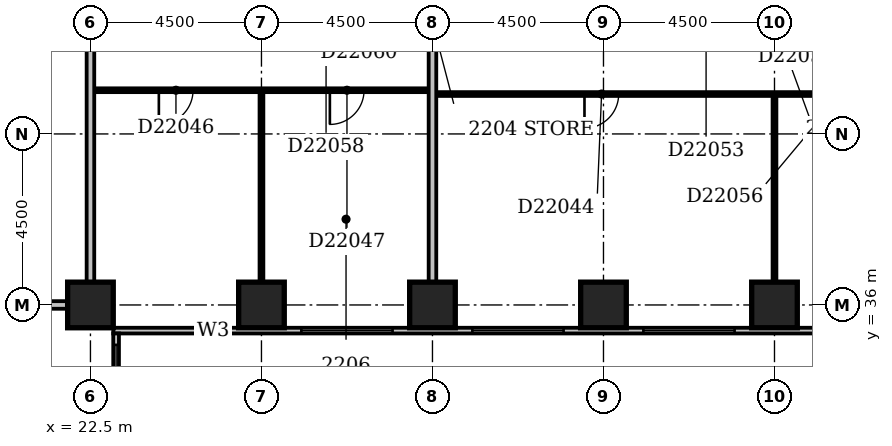
"""IFC4 building model, lengths in metres.
Left out: names, types, materials, properties, quantities, classifications, styles, units other than length and angle.
Written with IfcOpenShell. Run it as: python <this file> out.ifc"""

import sys

from ifc_helpers import new_model, si_unit, direction, frame, frame_2d, origin, origin_2d, place, context, subcontext, project, spatial, rectangle, extrude, element, fill, save


model = new_model("IFC4")
c1 = context("Model", 3, precision=1e-05, world=origin(), true_north=direction((0.0, 1.0)))
c2 = subcontext(c1, "Body", "Model", "MODEL_VIEW")
j1 = project(units=[si_unit("LENGTHUNIT", "METRE"), si_unit("PLANEANGLEUNIT", "RADIAN")], contexts=[c1])
p1 = place(None, origin())
s1 = spatial("IfcSite", under=j1, at=p1, CompositionType="ELEMENT")
p2 = place(p1, origin())
s2 = spatial("IfcBuilding", under=s1, at=p2, CompositionType="ELEMENT")
p3 = place(p2, frame((0.0, 0.0, 90.2)))
s3 = spatial("IfcBuildingStorey", under=s2, at=p3, CompositionType="ELEMENT", Elevation=90.2)
for number, where, z_axis, x_axis in (
    (1, (22.5, 36.0, -0.3), (0.0, 0.0, 1.0), (1.0, 0.0, 0.0)),
    (2, (27.0, 36.0, -0.3), (0.0, 0.0, 1.0), (1.0, 0.0, 0.0)),
    (3, (31.5, 36.0, -0.3), (0.0, 0.0, 1.0), (1.0, 0.0, 0.0)),
    (4, (36.0, 36.0, -0.3), (0.0, 0.0, 1.0), (1.0, 0.0, 0.0)),
    (5, (40.5, 36.0, -0.3), (0.0, 0.0, 1.0), (1.0, 0.0, 0.0)),
):
    element("IfcColumn", number, at=place(p3, frame(where, z_axis=z_axis, x_axis=x_axis)), inside=s3, PredefinedType="COLUMN", context=c2, shape_type="SweptSolid", body=[
        extrude(rectangle(XDim=1.2, YDim=1.2, at=origin_2d()), origin(), (0.0, 0.0, 1.0), 3.6),
    ])
p4 = place(p3, frame((23.175, 17.4, 0.0), z_axis=(0.0, 0.0, 1.0), x_axis=(0.0, 1.0, 0.0)))
e6 = element("IfcWall", 6, at=p4, inside=s3, PredefinedType="STANDARD", context=c2, shape_type="SweptSolid", body=[
    extrude(rectangle(XDim=17.85, YDim=0.15, at=frame_2d((8.925, 0.0))), origin(), (0.0, 0.0, 1.0), 2.7),
])
p5 = place(p4, frame((3.0, 0.0, 0.6)))
e7 = element("IfcOpeningElement", 7, at=p5, cuts=e6, PredefinedType="OPENING", context=c2, shape_type="SweptSolid", body=[
    extrude(rectangle(XDim=1.2, YDim=1.8, at=frame_2d((0.6, 0.9))), frame((0.0, 0.087, 0.0), z_axis=(0.0, -1.0, 0.0), x_axis=(1.0, 0.0, 0.0)), (0.0, 0.0, 1.0), 0.174),
])
p6 = place(p4, frame((6.15, 0.0, 0.6)))
e8 = element("IfcOpeningElement", 8, at=p6, cuts=e6, PredefinedType="OPENING", context=c2, shape_type="SweptSolid", body=[
    extrude(rectangle(XDim=2.4, YDim=1.8, at=frame_2d((1.2, 0.9))), frame((0.0, 0.087, 0.0), z_axis=(0.0, -1.0, 0.0), x_axis=(1.0, 0.0, 0.0)), (0.0, 0.0, 1.0), 0.174),
])
p7 = place(p4, frame((10.65, 0.0, 0.6)))
e9 = element("IfcOpeningElement", 9, at=p7, cuts=e6, PredefinedType="OPENING", context=c2, shape_type="SweptSolid", body=[
    extrude(rectangle(XDim=2.4, YDim=1.8, at=frame_2d((1.2, 0.9))), frame((0.0, 0.087, 0.0), z_axis=(0.0, -1.0, 0.0), x_axis=(1.0, 0.0, 0.0)), (0.0, 0.0, 1.0), 0.174),
])
p8 = place(p4, frame((15.15, 0.0, 0.6)))
e10 = element("IfcOpeningElement", 10, at=p8, cuts=e6, PredefinedType="OPENING", context=c2, shape_type="SweptSolid", body=[
    extrude(rectangle(XDim=2.4, YDim=1.8, at=frame_2d((1.2, 0.9))), frame((0.0, 0.087, 0.0), z_axis=(0.0, -1.0, 0.0), x_axis=(1.0, 0.0, 0.0)), (0.0, 0.0, 1.0), 0.174),
])
p9 = place(p3, frame((23.1, 35.325, 0.0), z_axis=(0.0, 0.0, 1.0), x_axis=(1.0, 0.0, 0.0)))
e11 = element("IfcWall", 11, at=p9, inside=s3, PredefinedType="STANDARD", context=c2, shape_type="SweptSolid", body=[
    extrude(rectangle(XDim=45.15, YDim=0.15, at=frame_2d((22.575, 0.0))), origin(), (0.0, 0.0, 1.0), 2.7),
])
p10 = place(p9, frame((2.185, 0.0, 0.6)))
e12 = element("IfcOpeningElement", 12, at=p10, cuts=e11, PredefinedType="OPENING", context=c2, shape_type="SweptSolid", body=[
    extrude(rectangle(XDim=0.9, YDim=1.8, at=frame_2d((0.45, 0.9))), frame((0.0, 0.087, 0.0), z_axis=(0.0, -1.0, 0.0), x_axis=(1.0, 0.0, 0.0)), (0.0, 0.0, 1.0), 0.174),
])
p11 = place(p9, frame((4.95, 0.0, 0.6)))
e13 = element("IfcOpeningElement", 13, at=p11, cuts=e11, PredefinedType="OPENING", context=c2, shape_type="SweptSolid", body=[
    extrude(rectangle(XDim=2.4, YDim=1.8, at=frame_2d((1.2, 0.9))), frame((0.0, 0.087, 0.0), z_axis=(0.0, -1.0, 0.0), x_axis=(1.0, 0.0, 0.0)), (0.0, 0.0, 1.0), 0.174),
])
p12 = place(p9, frame((9.45, 0.0, 0.6)))
e14 = element("IfcOpeningElement", 14, at=p12, cuts=e11, PredefinedType="OPENING", context=c2, shape_type="SweptSolid", body=[
    extrude(rectangle(XDim=2.4, YDim=1.8, at=frame_2d((1.2, 0.9))), frame((0.0, 0.087, 0.0), z_axis=(0.0, -1.0, 0.0), x_axis=(1.0, 0.0, 0.0)), (0.0, 0.0, 1.0), 0.174),
])
p13 = place(p9, frame((13.95, 0.0, 0.6)))
e15 = element("IfcOpeningElement", 15, at=p13, cuts=e11, PredefinedType="OPENING", context=c2, shape_type="SweptSolid", body=[
    extrude(rectangle(XDim=2.4, YDim=1.8, at=frame_2d((1.2, 0.9))), frame((0.0, 0.087, 0.0), z_axis=(0.0, -1.0, 0.0), x_axis=(1.0, 0.0, 0.0)), (0.0, 0.0, 1.0), 0.174),
])
p14 = place(p9, frame((18.45, 0.0, 0.6)))
e16 = element("IfcOpeningElement", 16, at=p14, cuts=e11, PredefinedType="OPENING", context=c2, shape_type="SweptSolid", body=[
    extrude(rectangle(XDim=2.4, YDim=1.8, at=frame_2d((1.2, 0.9))), frame((0.0, 0.087, 0.0), z_axis=(0.0, -1.0, 0.0), x_axis=(1.0, 0.0, 0.0)), (0.0, 0.0, 1.0), 0.174),
])
p15 = place(p9, frame((22.71, 0.0, 0.6)))
e17 = element("IfcOpeningElement", 17, at=p15, cuts=e11, PredefinedType="OPENING", context=c2, shape_type="SweptSolid", body=[
    extrude(rectangle(XDim=1.8, YDim=1.8, at=frame_2d((0.9, 0.9))), frame((0.0, 0.087, 0.0), z_axis=(0.0, -1.0, 0.0), x_axis=(1.0, 0.0, 0.0)), (0.0, 0.0, 1.0), 0.174),
])
p16 = place(p9, frame((28.861, 0.0, 0.6)))
e18 = element("IfcOpeningElement", 18, at=p16, cuts=e11, PredefinedType="OPENING", context=c2, shape_type="SweptSolid", body=[
    extrude(rectangle(XDim=1.2, YDim=1.8, at=frame_2d((0.6, 0.9))), frame((0.0, 0.087, 0.0), z_axis=(0.0, -1.0, 0.0), x_axis=(1.0, 0.0, 0.0)), (0.0, 0.0, 1.0), 0.174),
])
p17 = place(p9, frame((31.95, 0.0, 0.6)))
e19 = element("IfcOpeningElement", 19, at=p17, cuts=e11, PredefinedType="OPENING", context=c2, shape_type="SweptSolid", body=[
    extrude(rectangle(XDim=2.4, YDim=1.8, at=frame_2d((1.2, 0.9))), frame((0.0, 0.087, 0.0), z_axis=(0.0, -1.0, 0.0), x_axis=(1.0, 0.0, 0.0)), (0.0, 0.0, 1.0), 0.174),
])
p18 = place(p9, frame((36.45, 0.0, 0.6)))
e20 = element("IfcOpeningElement", 20, at=p18, cuts=e11, PredefinedType="OPENING", context=c2, shape_type="SweptSolid", body=[
    extrude(rectangle(XDim=2.4, YDim=1.8, at=frame_2d((1.2, 0.9))), frame((0.0, 0.087, 0.0), z_axis=(0.0, -1.0, 0.0), x_axis=(1.0, 0.0, 0.0)), (0.0, 0.0, 1.0), 0.174),
])
p19 = place(p9, frame((40.95, 0.0, 0.6)))
e21 = element("IfcOpeningElement", 21, at=p19, cuts=e11, PredefinedType="OPENING", context=c2, shape_type="SweptSolid", body=[
    extrude(rectangle(XDim=2.4, YDim=1.8, at=frame_2d((1.2, 0.9))), frame((0.0, 0.087, 0.0), z_axis=(0.0, -1.0, 0.0), x_axis=(1.0, 0.0, 0.0)), (0.0, 0.0, 1.0), 0.174),
])
p20 = place(p3, frame((9.1, 36.0, 0.0), z_axis=(0.0, 0.0, 1.0), x_axis=(1.0, 0.0, 0.0)))
e22 = element("IfcWall", 22, at=p20, inside=s3, PredefinedType="PARTITIONING", context=c2, shape_type="SweptSolid", body=[
    extrude(rectangle(XDim=12.8, YDim=0.2, at=frame_2d((6.4, 0.0))), origin(), (0.0, 0.0, 1.0), 2.4),
])
p21 = place(p3, frame((22.5, 36.6, 0.0), z_axis=(0.0, 0.0, 1.0), x_axis=(0.0, 1.0, 0.0)))
e23 = element("IfcWall", 23, at=p21, inside=s3, PredefinedType="PARTITIONING", context=c2, shape_type="SweptSolid", body=[
    extrude(rectangle(XDim=12.8, YDim=0.2, at=frame_2d((6.4, 0.0))), origin(), (0.0, 0.0, 1.0), 3.3),
])
p22 = place(p3, frame((27.0, 36.6, 0.0), z_axis=(0.0, 0.0, 1.0), x_axis=(0.0, 1.0, 0.0)))
e24 = element("IfcWall", 24, at=p22, inside=s3, PredefinedType="PARTITIONING", context=c2, shape_type="SweptSolid", body=[
    extrude(rectangle(XDim=5.0, YDim=0.1, at=frame_2d((2.5, 0.0))), origin(), (0.0, 0.0, 1.0), 2.6),
])
p23 = place(p3, frame((31.5, 36.6, 0.0), z_axis=(0.0, 0.0, 1.0), x_axis=(0.0, 1.0, 0.0)))
e25 = element("IfcWall", 25, at=p23, inside=s3, PredefinedType="PARTITIONING", context=c2, shape_type="SweptSolid", body=[
    extrude(rectangle(XDim=12.8, YDim=0.2, at=frame_2d((6.4, 0.0))), origin(), (0.0, 0.0, 1.0), 3.3),
])
p24 = place(p3, frame((40.5, 36.6, 0.0), z_axis=(0.0, 0.0, 1.0), x_axis=(0.0, 1.0, 0.0)))
e26 = element("IfcWall", 26, at=p24, inside=s3, PredefinedType="PARTITIONING", context=c2, shape_type="SweptSolid", body=[
    extrude(rectangle(XDim=4.9, YDim=0.1, at=frame_2d((2.45, 0.0))), origin(), (0.0, 0.0, 1.0), 3.3),
])
p25 = place(p3, frame((31.6, 41.55, 0.0), z_axis=(0.0, 0.0, 1.0), x_axis=(1.0, 0.0, 0.0)))
e27 = element("IfcWall", 27, at=p25, inside=s3, PredefinedType="PARTITIONING", context=c2, shape_type="SweptSolid", body=[
    extrude(rectangle(XDim=13.3, YDim=0.1, at=frame_2d((6.65, 0.0))), origin(), (0.0, 0.0, 1.0), 3.3),
])
p26 = place(p25, frame((3.9, 0.0, 0.0)))
e28 = element("IfcOpeningElement", 28, at=p26, cuts=e27, PredefinedType="OPENING", context=c2, shape_type="SweptSolid", body=[
    extrude(rectangle(XDim=0.9, YDim=2.1, at=frame_2d((0.45, 1.05))), frame((0.0, 0.062, 0.0), z_axis=(0.0, -1.0, 0.0), x_axis=(1.0, 0.0, 0.0)), (0.0, 0.0, 1.0), 0.124),
])
p27 = place(p25, frame((10.7, 0.0, 0.0)))
e29 = element("IfcOpeningElement", 29, at=p27, cuts=e27, PredefinedType="OPENING", context=c2, shape_type="SweptSolid", body=[
    extrude(rectangle(XDim=0.9, YDim=2.1, at=frame_2d((0.45, 1.05))), frame((0.0, 0.062, 0.0), z_axis=(0.0, -1.0, 0.0), x_axis=(1.0, 0.0, 0.0)), (0.0, 0.0, 1.0), 0.124),
])
p28 = place(p3, frame((22.6, 41.65, 0.0), z_axis=(0.0, 0.0, 1.0), x_axis=(1.0, 0.0, 0.0)))
e30 = element("IfcWall", 30, at=p28, inside=s3, PredefinedType="PARTITIONING", context=c2, shape_type="SweptSolid", body=[
    extrude(rectangle(XDim=8.8, YDim=0.1, at=frame_2d((4.4, 0.0))), origin(), (0.0, 0.0, 1.0), 3.3),
])
p29 = place(p28, frame((1.7, 0.0, 0.0)))
e31 = element("IfcOpeningElement", 31, at=p29, cuts=e30, PredefinedType="OPENING", context=c2, shape_type="SweptSolid", body=[
    extrude(rectangle(XDim=0.9, YDim=2.1, at=frame_2d((0.45, 1.05))), frame((0.0, 0.062, 0.0), z_axis=(0.0, -1.0, 0.0), x_axis=(1.0, 0.0, 0.0)), (0.0, 0.0, 1.0), 0.124),
])
p30 = place(p28, frame((6.2, 0.0, 0.0)))
e32 = element("IfcOpeningElement", 32, at=p30, cuts=e30, PredefinedType="OPENING", context=c2, shape_type="SweptSolid", body=[
    extrude(rectangle(XDim=0.9, YDim=2.1, at=frame_2d((0.45, 1.05))), frame((0.0, 0.062, 0.0), z_axis=(0.0, -1.0, 0.0), x_axis=(1.0, 0.0, 0.0)), (0.0, 0.0, 1.0), 0.124),
])
p31 = place(p8, origin())
e33 = element("IfcWindow", 33, at=p31, inside=s3, PartitioningType="SINGLE_PANEL", PredefinedType="WINDOW", context=c2, shape_type="SweptSolid", body=[
    extrude(rectangle(XDim=2.4, YDim=1.8, at=frame_2d((1.2, 0.9))), frame((0.0, 0.03, 0.0), z_axis=(0.0, -1.0, 0.0), x_axis=(1.0, 0.0, 0.0)), (0.0, 0.0, 1.0), 0.06),
])
fill(e10, e33)
p32 = place(p10, origin())
e34 = element("IfcWindow", 34, at=p32, inside=s3, PartitioningType="SINGLE_PANEL", PredefinedType="WINDOW", context=c2, shape_type="SweptSolid", body=[
    extrude(rectangle(XDim=0.9, YDim=1.8, at=frame_2d((0.45, 0.9))), frame((0.0, 0.03, 0.0), z_axis=(0.0, -1.0, 0.0), x_axis=(1.0, 0.0, 0.0)), (0.0, 0.0, 1.0), 0.06),
])
fill(e12, e34)
p33 = place(p11, origin())
e35 = element("IfcWindow", 35, at=p33, inside=s3, PartitioningType="SINGLE_PANEL", PredefinedType="WINDOW", context=c2, shape_type="SweptSolid", body=[
    extrude(rectangle(XDim=2.4, YDim=1.8, at=frame_2d((1.2, 0.9))), frame((0.0, 0.03, 0.0), z_axis=(0.0, -1.0, 0.0), x_axis=(1.0, 0.0, 0.0)), (0.0, 0.0, 1.0), 0.06),
])
fill(e13, e35)
p34 = place(p12, origin())
e36 = element("IfcWindow", 36, at=p34, inside=s3, PartitioningType="SINGLE_PANEL", PredefinedType="WINDOW", context=c2, shape_type="SweptSolid", body=[
    extrude(rectangle(XDim=2.4, YDim=1.8, at=frame_2d((1.2, 0.9))), frame((0.0, 0.03, 0.0), z_axis=(0.0, -1.0, 0.0), x_axis=(1.0, 0.0, 0.0)), (0.0, 0.0, 1.0), 0.06),
])
fill(e14, e36)
p35 = place(p13, origin())
e37 = element("IfcWindow", 37, at=p35, inside=s3, PartitioningType="SINGLE_PANEL", PredefinedType="WINDOW", context=c2, shape_type="SweptSolid", body=[
    extrude(rectangle(XDim=2.4, YDim=1.8, at=frame_2d((1.2, 0.9))), frame((0.0, 0.03, 0.0), z_axis=(0.0, -1.0, 0.0), x_axis=(1.0, 0.0, 0.0)), (0.0, 0.0, 1.0), 0.06),
])
fill(e15, e37)
p36 = place(p26, frame((0.9, 0.0, 0.0), z_axis=(0.0, 0.0, 1.0), x_axis=(-1.0, 0.0, 0.0)))
e38 = element("IfcDoor", 38, at=p36, inside=s3, OperationType="SINGLE_SWING_RIGHT", PredefinedType="DOOR", context=c2, shape_type="SweptSolid", body=[
    extrude(rectangle(XDim=0.9, YDim=2.1, at=frame_2d((0.45, 1.05))), frame((0.0, 0.025, 0.0), z_axis=(0.0, -1.0, 0.0), x_axis=(1.0, 0.0, 0.0)), (0.0, 0.0, 1.0), 0.05),
])
fill(e28, e38)
p37 = place(p29, frame((0.9, 0.0, 0.0), z_axis=(0.0, 0.0, 1.0), x_axis=(-1.0, 0.0, 0.0)))
e39 = element("IfcDoor", 39, at=p37, inside=s3, OperationType="SINGLE_SWING_RIGHT", PredefinedType="DOOR", context=c2, shape_type="SweptSolid", body=[
    extrude(rectangle(XDim=0.9, YDim=2.1, at=frame_2d((0.45, 1.05))), frame((0.0, 0.025, 0.0), z_axis=(0.0, -1.0, 0.0), x_axis=(1.0, 0.0, 0.0)), (0.0, 0.0, 1.0), 0.05),
])
fill(e31, e39)
p38 = place(p30, frame((0.9, 0.0, 0.0), z_axis=(0.0, 0.0, 1.0), x_axis=(-1.0, 0.0, 0.0)))
e40 = element("IfcDoor", 40, at=p38, inside=s3, OperationType="SINGLE_SWING_RIGHT", PredefinedType="DOOR", context=c2, shape_type="SweptSolid", body=[
    extrude(rectangle(XDim=0.9, YDim=2.1, at=frame_2d((0.45, 1.05))), frame((0.0, 0.025, 0.0), z_axis=(0.0, -1.0, 0.0), x_axis=(1.0, 0.0, 0.0)), (0.0, 0.0, 1.0), 0.05),
])
fill(e32, e40)
save(model, sys.argv[1])
